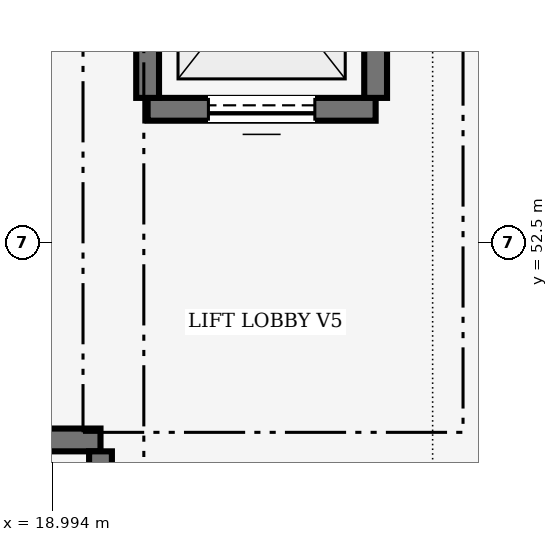
"""IFC4 building model, lengths in metres.
Left out: names, types, materials, properties, quantities, classifications, styles, units other than length and angle.
Written with IfcOpenShell. Run it as: python <this file> out.ifc"""

import sys

from ifc_helpers import new_model, si_unit, direction, frame, frame_2d, origin, place, context, subcontext, project, spatial, rectangle, extrude, element, fill, save


model = new_model("IFC4")
c1 = context("Model", 3, precision=1e-05, world=origin(), true_north=direction((0.0, 1.0)))
c2 = subcontext(c1, "Body", "Model", "MODEL_VIEW")
j1 = project(units=[si_unit("LENGTHUNIT", "METRE"), si_unit("PLANEANGLEUNIT", "RADIAN")], contexts=[c1])
p1 = place(None, origin())
s1 = spatial("IfcSite", under=j1, at=p1, CompositionType="ELEMENT")
p2 = place(p1, origin())
s2 = spatial("IfcBuilding", under=s1, at=p2, CompositionType="ELEMENT")
p3 = place(p2, frame((0.0, 0.0, -4.2)))
s3 = spatial("IfcBuildingStorey", under=s2, at=p3, CompositionType="ELEMENT", Elevation=-4.2)
p4 = place(p3, frame((9.45, 49.9, 0.0), z_axis=(0.0, 0.0, 1.0), x_axis=(1.0, 0.0, 0.0)))
e1 = element("IfcWall", 1, at=p4, inside=s3, PredefinedType="SHEAR", context=c2, shape_type="SweptSolid", body=[
    extrude(rectangle(XDim=10.18, YDim=0.3, at=frame_2d((5.09, 0.0))), origin(), (0.0, 0.0, 1.0), 3.92),
])
p5 = place(p3, frame((19.63, 49.75, 0.0), z_axis=(0.0, 0.0, 1.0), x_axis=(0.0, -1.0, 0.0)))
e2 = element("IfcWall", 2, at=p5, inside=s3, PredefinedType="SHEAR", context=c2, shape_type="SweptSolid", body=[
    extrude(rectangle(XDim=4.15, YDim=0.3, at=frame_2d((2.075, 0.0))), origin(), (0.0, 0.0, 1.0), 3.92),
])
p6 = place(p3, frame((23.25, 54.25, 0.0), z_axis=(0.0, 0.0, 1.0), x_axis=(-1.0, 0.0, 0.0)))
e3 = element("IfcWall", 3, at=p6, inside=s3, PredefinedType="SHEAR", context=c2, shape_type="SweptSolid", body=[
    extrude(rectangle(XDim=3.0, YDim=0.3, at=frame_2d((1.5, 0.0))), origin(), (0.0, 0.0, 1.0), 3.92),
])
p7 = place(p6, frame((0.8, 0.0, 0.0)))
e4 = element("IfcOpeningElement", 4, at=p7, cuts=e3, PredefinedType="OPENING", context=c2, shape_type="SweptSolid", body=[
    extrude(rectangle(XDim=1.4, YDim=2.2, at=frame_2d((0.7, 1.1))), frame((0.0, 0.15, 0.0), z_axis=(0.0, -1.0, 0.0), x_axis=(1.0, 0.0, 0.0)), (0.0, 0.0, 1.0), 0.3),
])
for number, where, z_axis, x_axis in (
    (5, (20.25, 54.4, 0.0), (0.0, 0.0, 1.0), (0.0, 1.0, 0.0)),
    (6, (23.25, 57.7, 0.0), (0.0, 0.0, 1.0), (0.0, -1.0, 0.0)),
):
    element("IfcWall", number, at=place(p3, frame(where, z_axis=z_axis, x_axis=x_axis)), inside=s3, PredefinedType="SHEAR", context=c2, shape_type="SweptSolid", body=[
        extrude(rectangle(XDim=3.3, YDim=0.3, at=frame_2d((1.65, 0.0))), origin(), (0.0, 0.0, 1.0), 3.92),
    ])
p8 = place(p7, origin())
e7 = element("IfcDoor", 7, at=p8, inside=s3, OperationType="DOUBLE_DOOR_SLIDING", PredefinedType="DOOR", context=c2, shape_type="SweptSolid", body=[
    extrude(rectangle(XDim=1.4, YDim=2.2, at=frame_2d((0.7, 1.1))), frame((0.0, 0.025, 0.0), z_axis=(0.0, -1.0, 0.0), x_axis=(1.0, 0.0, 0.0)), (0.0, 0.0, 1.0), 0.05),
])
fill(e4, e7)
save(model, sys.argv[1])
